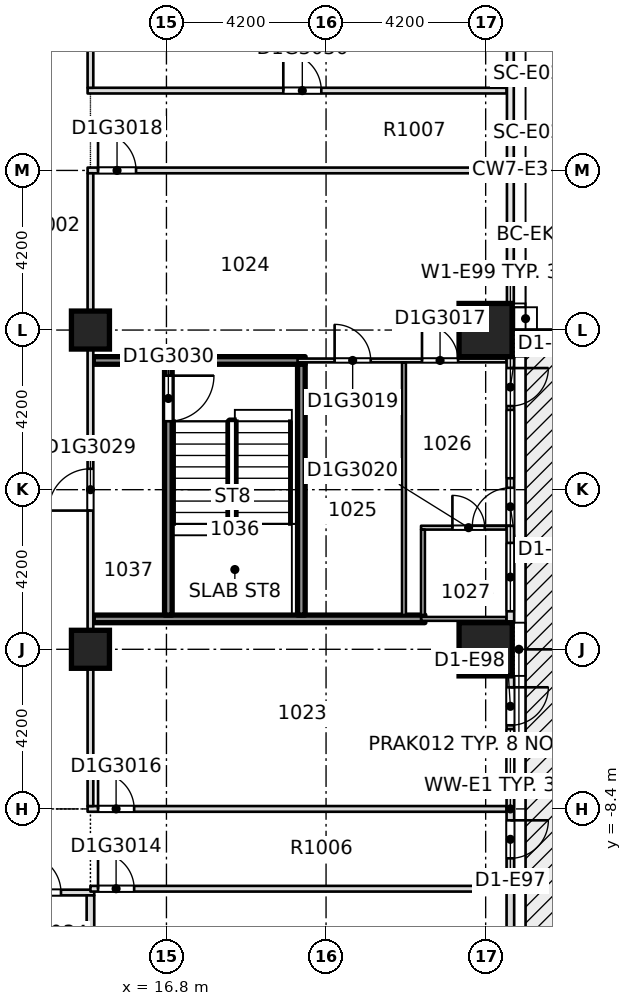
"""IFC4 building model, lengths in metres.
Left out: names, types, materials, properties, quantities, classifications, styles, units other than length and angle.
Written with IfcOpenShell. Run it as: python <this file> out.ifc"""

import sys

from ifc_helpers import new_model, si_unit, direction, frame, frame_2d, origin, origin_2d, place, context, subcontext, project, spatial, rectangle, extrude, element, fill, save


model = new_model("IFC4")
c1 = context("Model", 3, precision=1e-05, world=origin(), true_north=direction((0.0, 1.0)))
c2 = subcontext(c1, "Body", "Model", "MODEL_VIEW")
j1 = project(units=[si_unit("LENGTHUNIT", "METRE"), si_unit("PLANEANGLEUNIT", "RADIAN")], contexts=[c1])
p1 = place(None, origin())
s1 = spatial("IfcSite", under=j1, at=p1, CompositionType="ELEMENT")
p2 = place(p1, origin())
s2 = spatial("IfcBuilding", under=s1, at=p2, CompositionType="ELEMENT")
p3 = place(p2, frame((0.0, 0.0, 48.3)))
s3 = spatial("IfcBuildingStorey", under=s2, at=p3, CompositionType="ELEMENT", Elevation=48.3)
for number, where, z_axis, x_axis in (
    (1, (25.2, -4.2, -0.32), (0.0, 0.0, 1.0), (1.0, 0.0, 0.0)),
    (2, (25.2, 4.2, -0.32), (0.0, 0.0, 1.0), (1.0, 0.0, 0.0)),
):
    element("IfcColumn", number, at=place(p3, frame(where, z_axis=z_axis, x_axis=x_axis)), inside=s3, PredefinedType="COLUMN", context=c2, shape_type="SweptSolid", body=[
        extrude(rectangle(XDim=1.4, YDim=1.4, at=origin_2d()), origin(), (0.0, 0.0, 1.0), 3.45),
    ])
for number, where, z_axis, x_axis in (
    (3, (14.8, -4.2, -0.32), (0.0, 0.0, 1.0), (1.0, 0.0, 0.0)),
    (4, (14.8, 4.2, -0.32), (0.0, 0.0, 1.0), (1.0, 0.0, 0.0)),
):
    element("IfcColumn", number, at=place(p3, frame(where, z_axis=z_axis, x_axis=x_axis)), inside=s3, PredefinedType="COLUMN", context=c2, shape_type="SweptSolid", body=[
        extrude(rectangle(XDim=1.0, YDim=1.0, at=origin_2d()), origin(), (0.0, 0.0, 1.0), 3.45),
    ])
p4 = place(p3, frame((8.5, -10.6, 0.0), z_axis=(0.0, 0.0, 1.0), x_axis=(1.0, 0.0, 0.0)))
e5 = element("IfcWall", 5, at=p4, inside=s3, PredefinedType="PARTITIONING", context=c2, shape_type="SweptSolid", body=[
    extrude(rectangle(XDim=6.4, YDim=0.15, at=frame_2d((3.2, 0.0))), origin(), (0.0, 0.0, 1.0), 3.13),
])
p5 = place(p4, frame((1.35, 0.0, 0.0)))
e6 = element("IfcOpeningElement", 6, at=p5, cuts=e5, PredefinedType="OPENING", context=c2, shape_type="SweptSolid", body=[
    extrude(rectangle(XDim=1.1, YDim=2.1, at=frame_2d((0.55, 1.05))), frame((0.0, 0.085, 0.0), z_axis=(0.0, -1.0, 0.0), x_axis=(1.0, 0.0, 0.0)), (0.0, 0.0, 1.0), 0.17),
])
p6 = place(p4, frame((4.525, 0.0, 0.0)))
e7 = element("IfcOpeningElement", 7, at=p6, cuts=e5, PredefinedType="OPENING", context=c2, shape_type="SweptSolid", body=[
    extrude(rectangle(XDim=1.0, YDim=2.1, at=frame_2d((0.5, 1.05))), frame((0.0, 0.085, 0.0), z_axis=(0.0, -1.0, 0.0), x_axis=(1.0, 0.0, 0.0)), (0.0, 0.0, 1.0), 0.17),
])
p7 = place(p3, frame((14.8, -10.5, 0.0), z_axis=(0.0, 0.0, 1.0), x_axis=(1.0, 0.0, 0.0)))
e8 = element("IfcWall", 8, at=p7, inside=s3, PredefinedType="PARTITIONING", context=c2, shape_type="SweptSolid", body=[
    extrude(rectangle(XDim=10.95, YDim=0.15, at=frame_2d((5.475, 0.0))), origin(), (0.0, 0.0, 1.0), 3.13),
])
p8 = place(p7, frame((0.2, 0.0, 0.0)))
e9 = element("IfcOpeningElement", 9, at=p8, cuts=e8, PredefinedType="OPENING", context=c2, shape_type="SweptSolid", body=[
    extrude(rectangle(XDim=0.95, YDim=2.1, at=frame_2d((0.475, 1.05))), frame((0.0, 0.085, 0.0), z_axis=(0.0, -1.0, 0.0), x_axis=(1.0, 0.0, 0.0)), (0.0, 0.0, 1.0), 0.17),
])
p9 = place(p3, frame((14.725, -8.4, 0.0), z_axis=(0.0, 0.0, 1.0), x_axis=(1.0, 0.0, 0.0)))
e10 = element("IfcWall", 10, at=p9, inside=s3, PredefinedType="PARTITIONING", context=c2, shape_type="SweptSolid", body=[
    extrude(rectangle(XDim=11.025, YDim=0.15, at=frame_2d((5.512, 0.0))), origin(), (0.0, 0.0, 1.0), 3.13),
])
p10 = place(p9, frame((0.275, 0.0, 0.0)))
e11 = element("IfcOpeningElement", 11, at=p10, cuts=e10, PredefinedType="OPENING", context=c2, shape_type="SweptSolid", body=[
    extrude(rectangle(XDim=0.95, YDim=2.1, at=frame_2d((0.475, 1.05))), frame((0.0, 0.085, 0.0), z_axis=(0.0, -1.0, 0.0), x_axis=(1.0, 0.0, 0.0)), (0.0, 0.0, 1.0), 0.17),
])
p11 = place(p3, frame((14.875, -3.4, 0.0), z_axis=(0.0, 0.0, 1.0), x_axis=(1.0, 0.0, 0.0)))
e12 = element("IfcWall", 12, at=p11, inside=s3, PredefinedType="SOLIDWALL", context=c2, shape_type="SweptSolid", body=[
    extrude(rectangle(XDim=8.725, YDim=0.2, at=frame_2d((4.363, 0.0))), origin(), (0.0, 0.0, 1.0), 3.13),
])
p12 = place(p3, frame((23.5, -3.4, 0.0), z_axis=(0.0, 0.0, 1.0), x_axis=(1.0, 0.0, 0.0)))
e13 = element("IfcWall", 13, at=p12, inside=s3, PredefinedType="PARTITIONING", context=c2, shape_type="SweptSolid", body=[
    extrude(rectangle(XDim=2.25, YDim=0.1, at=frame_2d((1.125, 0.0))), origin(), (0.0, 0.0, 1.0), 3.13),
])
p13 = place(p3, frame((23.5, -1.0, 0.0), z_axis=(0.0, 0.0, 1.0), x_axis=(1.0, 0.0, 0.0)))
e14 = element("IfcWall", 14, at=p13, inside=s3, PredefinedType="PARTITIONING", context=c2, shape_type="SweptSolid", body=[
    extrude(rectangle(XDim=2.25, YDim=0.1, at=frame_2d((1.125, 0.0))), origin(), (0.0, 0.0, 1.0), 3.13),
])
p14 = place(p13, frame((0.825, 0.0, 0.0)))
e15 = element("IfcOpeningElement", 15, at=p14, cuts=e14, PredefinedType="OPENING", context=c2, shape_type="SweptSolid", body=[
    extrude(rectangle(XDim=0.85, YDim=2.1, at=frame_2d((0.425, 1.05))), frame((0.0, 0.06, 0.0), z_axis=(0.0, -1.0, 0.0), x_axis=(1.0, 0.0, 0.0)), (0.0, 0.0, 1.0), 0.12),
])
p15 = place(p3, frame((14.875, 3.4, 0.0), z_axis=(0.0, 0.0, 1.0), x_axis=(1.0, 0.0, 0.0)))
e16 = element("IfcWall", 16, at=p15, inside=s3, PredefinedType="SOLIDWALL", context=c2, shape_type="SweptSolid", body=[
    extrude(rectangle(XDim=5.575, YDim=0.2, at=frame_2d((2.788, 0.0))), origin(), (0.0, 0.0, 1.0), 3.13),
])
p16 = place(p3, frame((20.25, 3.4, 0.0), z_axis=(0.0, 0.0, 1.0), x_axis=(1.0, 0.0, 0.0)))
e17 = element("IfcWall", 17, at=p16, inside=s3, PredefinedType="PARTITIONING", context=c2, shape_type="SweptSolid", body=[
    extrude(rectangle(XDim=5.5, YDim=0.1, at=frame_2d((2.75, 0.0))), origin(), (0.0, 0.0, 1.0), 3.13),
])
p17 = place(p16, frame((3.275, 0.0, 0.0)))
e18 = element("IfcOpeningElement", 18, at=p17, cuts=e17, PredefinedType="OPENING", context=c2, shape_type="SweptSolid", body=[
    extrude(rectangle(XDim=0.95, YDim=2.1, at=frame_2d((0.475, 1.05))), frame((0.0, 0.06, 0.0), z_axis=(0.0, -1.0, 0.0), x_axis=(1.0, 0.0, 0.0)), (0.0, 0.0, 1.0), 0.12),
])
p18 = place(p16, frame((0.975, 0.0, 0.0)))
e19 = element("IfcOpeningElement", 19, at=p18, cuts=e17, PredefinedType="OPENING", context=c2, shape_type="SweptSolid", body=[
    extrude(rectangle(XDim=0.95, YDim=2.1, at=frame_2d((0.475, 1.05))), frame((0.0, 0.06, 0.0), z_axis=(0.0, -1.0, 0.0), x_axis=(1.0, 0.0, 0.0)), (0.0, 0.0, 1.0), 0.12),
])
p19 = place(p3, frame((14.725, 8.4, 0.0), z_axis=(0.0, 0.0, 1.0), x_axis=(1.0, 0.0, 0.0)))
e20 = element("IfcWall", 20, at=p19, inside=s3, PredefinedType="PARTITIONING", context=c2, shape_type="SweptSolid", body=[
    extrude(rectangle(XDim=11.025, YDim=0.15, at=frame_2d((5.512, 0.0))), origin(), (0.0, 0.0, 1.0), 3.13),
])
p20 = place(p19, frame((0.275, 0.0, 0.0)))
e21 = element("IfcOpeningElement", 21, at=p20, cuts=e20, PredefinedType="OPENING", context=c2, shape_type="SweptSolid", body=[
    extrude(rectangle(XDim=1.0, YDim=2.1, at=frame_2d((0.5, 1.05))), frame((0.0, 0.085, 0.0), z_axis=(0.0, -1.0, 0.0), x_axis=(1.0, 0.0, 0.0)), (0.0, 0.0, 1.0), 0.17),
])
p21 = place(p3, frame((14.725, 10.5, 0.0), z_axis=(0.0, 0.0, 1.0), x_axis=(1.0, 0.0, 0.0)))
e22 = element("IfcWall", 22, at=p21, inside=s3, PredefinedType="PARTITIONING", context=c2, shape_type="SweptSolid", body=[
    extrude(rectangle(XDim=11.025, YDim=0.15, at=frame_2d((5.512, 0.0))), origin(), (0.0, 0.0, 1.0), 3.13),
])
p22 = place(p21, frame((5.15, 0.0, 0.0)))
e23 = element("IfcOpeningElement", 23, at=p22, cuts=e22, PredefinedType="OPENING", context=c2, shape_type="SweptSolid", body=[
    extrude(rectangle(XDim=1.0, YDim=2.1, at=frame_2d((0.5, 1.05))), frame((0.0, 0.085, 0.0), z_axis=(0.0, -1.0, 0.0), x_axis=(1.0, 0.0, 0.0)), (0.0, 0.0, 1.0), 0.17),
])
p23 = place(p3, frame((14.8, -19.3, 0.0), z_axis=(0.0, 0.0, 1.0), x_axis=(0.0, 1.0, 0.0)))
e24 = element("IfcWall", 24, at=p23, inside=s3, PredefinedType="PARTITIONING", context=c2, shape_type="SweptSolid", body=[
    extrude(rectangle(XDim=8.625, YDim=0.2, at=frame_2d((4.312, 0.0))), origin(), (0.0, 0.0, 1.0), 3.13),
])
p24 = place(p3, frame((14.8, -8.325, 0.0), z_axis=(0.0, 0.0, 1.0), x_axis=(0.0, 1.0, 0.0)))
e25 = element("IfcWall", 25, at=p24, inside=s3, PredefinedType="PARTITIONING", context=c2, shape_type="SweptSolid", body=[
    extrude(rectangle(XDim=16.65, YDim=0.15, at=frame_2d((8.325, 0.0))), origin(), (0.0, 0.0, 1.0), 3.13),
])
p25 = place(p24, frame((7.775, 0.0, 0.0)))
e26 = element("IfcOpeningElement", 26, at=p25, cuts=e25, PredefinedType="OPENING", context=c2, shape_type="SweptSolid", body=[
    extrude(rectangle(XDim=1.1, YDim=2.1, at=frame_2d((0.55, 1.05))), frame((0.0, 0.085, 0.0), z_axis=(0.0, -1.0, 0.0), x_axis=(1.0, 0.0, 0.0)), (0.0, 0.0, 1.0), 0.17),
])
p26 = place(p3, frame((14.8, 10.575, 0.0), z_axis=(0.0, 0.0, 1.0), x_axis=(0.0, 1.0, 0.0)))
e27 = element("IfcWall", 27, at=p26, inside=s3, PredefinedType="PARTITIONING", context=c2, shape_type="SweptSolid", body=[
    extrude(rectangle(XDim=2.725, YDim=0.15, at=frame_2d((1.363, 0.0))), origin(), (0.0, 0.0, 1.0), 3.13),
])
p27 = place(p3, frame((16.85, -3.3, 0.0), z_axis=(0.0, 0.0, 1.0), x_axis=(0.0, 1.0, 0.0)))
e28 = element("IfcWall", 28, at=p27, inside=s3, PredefinedType="SOLIDWALL", context=c2, shape_type="SweptSolid", body=[
    extrude(rectangle(XDim=6.6, YDim=0.2, at=frame_2d((3.3, 0.0))), origin(), (0.0, 0.0, 1.0), 3.13),
])
p28 = place(p27, frame((5.1, 0.0, 0.0)))
e29 = element("IfcOpeningElement", 29, at=p28, cuts=e28, PredefinedType="OPENING", context=c2, shape_type="SweptSolid", body=[
    extrude(rectangle(XDim=1.2, YDim=2.1, at=frame_2d((0.6, 1.05))), frame((0.0, 0.11, 0.0), z_axis=(0.0, -1.0, 0.0), x_axis=(1.0, 0.0, 0.0)), (0.0, 0.0, 1.0), 0.22),
])
p29 = place(p3, frame((20.35, -3.3, 0.0), z_axis=(0.0, 0.0, 1.0), x_axis=(0.0, 1.0, 0.0)))
e30 = element("IfcWall", 30, at=p29, inside=s3, PredefinedType="SOLIDWALL", context=c2, shape_type="SweptSolid", body=[
    extrude(rectangle(XDim=6.6, YDim=0.2, at=frame_2d((3.3, 0.0))), origin(), (0.0, 0.0, 1.0), 3.13),
])
p30 = place(p3, frame((23.05, -3.3, 0.0), z_axis=(0.0, 0.0, 1.0), x_axis=(0.0, 1.0, 0.0)))
e31 = element("IfcWall", 31, at=p30, inside=s3, PredefinedType="PARTITIONING", context=c2, shape_type="SweptSolid", body=[
    extrude(rectangle(XDim=6.65, YDim=0.1, at=frame_2d((3.325, 0.0))), origin(), (0.0, 0.0, 1.0), 3.13),
])
p31 = place(p3, frame((23.55, -3.3, 0.0), z_axis=(0.0, 0.0, 1.0), x_axis=(0.0, 1.0, 0.0)))
e32 = element("IfcWall", 32, at=p31, inside=s3, PredefinedType="PARTITIONING", context=c2, shape_type="SweptSolid", body=[
    extrude(rectangle(XDim=2.25, YDim=0.1, at=frame_2d((1.125, 0.0))), origin(), (0.0, 0.0, 1.0), 3.13),
])
p32 = place(p3, frame((25.85, -11.9, 0.0), z_axis=(0.0, 0.0, 1.0), x_axis=(0.0, 1.0, 0.0)))
e33 = element("IfcWall", 33, at=p32, inside=s3, PredefinedType="STANDARD", context=c2, shape_type="SweptSolid", body=[
    extrude(rectangle(XDim=7.0, YDim=0.2, at=frame_2d((3.5, 0.0))), origin(), (0.0, 0.0, 1.0), 3.13),
])
p33 = place(p32, frame((2.2, 0.0, 0.0)))
e34 = element("IfcOpeningElement", 34, at=p33, cuts=e33, PredefinedType="OPENING", context=c2, shape_type="SweptSolid", body=[
    extrude(rectangle(XDim=1.0, YDim=2.4, at=frame_2d((0.5, 1.2))), frame((0.0, 0.11, 0.0), z_axis=(0.0, -1.0, 0.0), x_axis=(1.0, 0.0, 0.0)), (0.0, 0.0, 1.0), 0.22),
])
p34 = place(p32, frame((3.8, 0.0, 0.2)))
e35 = element("IfcOpeningElement", 35, at=p34, cuts=e33, PredefinedType="OPENING", context=c2, shape_type="SweptSolid", body=[
    extrude(rectangle(XDim=1.8, YDim=2.65, at=frame_2d((0.9, 1.325))), frame((0.0, 0.11, 0.0), z_axis=(0.0, -1.0, 0.0), x_axis=(1.0, 0.0, 0.0)), (0.0, 0.0, 1.0), 0.22),
])
p35 = place(p32, frame((5.7, 0.0, 0.0)))
e36 = element("IfcOpeningElement", 36, at=p35, cuts=e33, PredefinedType="OPENING", context=c2, shape_type="SweptSolid", body=[
    extrude(rectangle(XDim=1.0, YDim=2.4, at=frame_2d((0.5, 1.2))), frame((0.0, 0.11, 0.0), z_axis=(0.0, -1.0, 0.0), x_axis=(1.0, 0.0, 0.0)), (0.0, 0.0, 1.0), 0.22),
])
p36 = place(p3, frame((25.85, -3.5, 0.0), z_axis=(0.0, 0.0, 1.0), x_axis=(0.0, 1.0, 0.0)))
e37 = element("IfcWall", 37, at=p36, inside=s3, PredefinedType="STANDARD", context=c2, shape_type="SweptSolid", body=[
    extrude(rectangle(XDim=7.0, YDim=0.2, at=frame_2d((3.5, 0.0))), origin(), (0.0, 0.0, 1.0), 3.13),
])
p37 = place(p36, frame((0.3, 0.0, 0.2)))
e38 = element("IfcOpeningElement", 38, at=p37, cuts=e37, PredefinedType="OPENING", context=c2, shape_type="SweptSolid", body=[
    extrude(rectangle(XDim=1.8, YDim=2.65, at=frame_2d((0.9, 1.325))), frame((0.0, 0.11, 0.0), z_axis=(0.0, -1.0, 0.0), x_axis=(1.0, 0.0, 0.0)), (0.0, 0.0, 1.0), 0.22),
])
p38 = place(p36, frame((2.55, 0.0, 0.0)))
e39 = element("IfcOpeningElement", 39, at=p38, cuts=e37, PredefinedType="OPENING", context=c2, shape_type="SweptSolid", body=[
    extrude(rectangle(XDim=1.0, YDim=2.4, at=frame_2d((0.5, 1.2))), frame((0.0, 0.11, 0.0), z_axis=(0.0, -1.0, 0.0), x_axis=(1.0, 0.0, 0.0)), (0.0, 0.0, 1.0), 0.22),
])
p39 = place(p36, frame((3.8, 0.0, 0.2)))
e40 = element("IfcOpeningElement", 40, at=p39, cuts=e37, PredefinedType="OPENING", context=c2, shape_type="SweptSolid", body=[
    extrude(rectangle(XDim=1.8, YDim=2.65, at=frame_2d((0.9, 1.325))), frame((0.0, 0.11, 0.0), z_axis=(0.0, -1.0, 0.0), x_axis=(1.0, 0.0, 0.0)), (0.0, 0.0, 1.0), 0.22),
])
p40 = place(p36, frame((5.7, 0.0, 0.0)))
e41 = element("IfcOpeningElement", 41, at=p40, cuts=e37, PredefinedType="OPENING", context=c2, shape_type="SweptSolid", body=[
    extrude(rectangle(XDim=1.0, YDim=2.4, at=frame_2d((0.5, 1.2))), frame((0.0, 0.11, 0.0), z_axis=(0.0, -1.0, 0.0), x_axis=(1.0, 0.0, 0.0)), (0.0, 0.0, 1.0), 0.22),
])
p41 = place(p8, origin())
e42 = element("IfcDoor", 42, at=p41, inside=s3, OperationType="SINGLE_SWING_RIGHT", PredefinedType="DOOR", context=c2, shape_type="SweptSolid", body=[
    extrude(rectangle(XDim=0.95, YDim=2.1, at=frame_2d((0.475, 1.05))), frame((0.0, 0.025, 0.0), z_axis=(0.0, -1.0, 0.0), x_axis=(1.0, 0.0, 0.0)), (0.0, 0.0, 1.0), 0.05),
])
fill(e9, e42)
p42 = place(p10, origin())
e43 = element("IfcDoor", 43, at=p42, inside=s3, OperationType="SINGLE_SWING_LEFT", PredefinedType="DOOR", context=c2, shape_type="SweptSolid", body=[
    extrude(rectangle(XDim=0.95, YDim=2.1, at=frame_2d((0.475, 1.05))), frame((0.0, 0.025, 0.0), z_axis=(0.0, -1.0, 0.0), x_axis=(1.0, 0.0, 0.0)), (0.0, 0.0, 1.0), 0.05),
])
fill(e11, e43)
p43 = place(p17, origin())
e44 = element("IfcDoor", 44, at=p43, inside=s3, OperationType="SINGLE_SWING_RIGHT", PredefinedType="DOOR", context=c2, shape_type="SweptSolid", body=[
    extrude(rectangle(XDim=0.95, YDim=2.1, at=frame_2d((0.475, 1.05))), frame((0.0, 0.025, 0.0), z_axis=(0.0, -1.0, 0.0), x_axis=(1.0, 0.0, 0.0)), (0.0, 0.0, 1.0), 0.05),
])
fill(e18, e44)
p44 = place(p20, origin())
e45 = element("IfcDoor", 45, at=p44, inside=s3, OperationType="SINGLE_SWING_RIGHT", PredefinedType="DOOR", context=c2, shape_type="SweptSolid", body=[
    extrude(rectangle(XDim=1.0, YDim=2.1, at=frame_2d((0.5, 1.05))), frame((0.0, 0.025, 0.0), z_axis=(0.0, -1.0, 0.0), x_axis=(1.0, 0.0, 0.0)), (0.0, 0.0, 1.0), 0.05),
])
fill(e21, e45)
p45 = place(p18, origin())
e46 = element("IfcDoor", 46, at=p45, inside=s3, OperationType="SINGLE_SWING_RIGHT", PredefinedType="DOOR", context=c2, shape_type="SweptSolid", body=[
    extrude(rectangle(XDim=0.95, YDim=2.1, at=frame_2d((0.475, 1.05))), frame((0.0, 0.025, 0.0), z_axis=(0.0, -1.0, 0.0), x_axis=(1.0, 0.0, 0.0)), (0.0, 0.0, 1.0), 0.05),
])
fill(e19, e46)
p46 = place(p14, origin())
e47 = element("IfcDoor", 47, at=p46, inside=s3, OperationType="SINGLE_SWING_RIGHT", PredefinedType="DOOR", context=c2, shape_type="SweptSolid", body=[
    extrude(rectangle(XDim=0.85, YDim=2.1, at=frame_2d((0.425, 1.05))), frame((0.0, 0.025, 0.0), z_axis=(0.0, -1.0, 0.0), x_axis=(1.0, 0.0, 0.0)), (0.0, 0.0, 1.0), 0.05),
])
fill(e15, e47)
p47 = place(p25, origin())
e48 = element("IfcDoor", 48, at=p47, inside=s3, OperationType="SINGLE_SWING_RIGHT", PredefinedType="DOOR", context=c2, shape_type="SweptSolid", body=[
    extrude(rectangle(XDim=1.1, YDim=2.1, at=frame_2d((0.55, 1.05))), frame((0.0, 0.025, 0.0), z_axis=(0.0, -1.0, 0.0), x_axis=(1.0, 0.0, 0.0)), (0.0, 0.0, 1.0), 0.05),
])
fill(e26, e48)
p48 = place(p28, origin())
e49 = element("IfcDoor", 49, at=p48, inside=s3, OperationType="SINGLE_SWING_LEFT", PredefinedType="DOOR", context=c2, shape_type="SweptSolid", body=[
    extrude(rectangle(XDim=1.2, YDim=2.1, at=frame_2d((0.6, 1.05))), frame((0.0, 0.025, 0.0), z_axis=(0.0, -1.0, 0.0), x_axis=(1.0, 0.0, 0.0)), (0.0, 0.0, 1.0), 0.05),
])
fill(e29, e49)
p49 = place(p6, origin())
e50 = element("IfcDoor", 50, at=p49, inside=s3, OperationType="SINGLE_SWING_RIGHT", PredefinedType="DOOR", context=c2, shape_type="SweptSolid", body=[
    extrude(rectangle(XDim=1.0, YDim=2.1, at=frame_2d((0.5, 1.05))), frame((0.0, 0.025, 0.0), z_axis=(0.0, -1.0, 0.0), x_axis=(1.0, 0.0, 0.0)), (0.0, 0.0, 1.0), 0.05),
])
fill(e7, e50)
p50 = place(p22, origin())
e51 = element("IfcDoor", 51, at=p50, inside=s3, OperationType="SINGLE_SWING_RIGHT", PredefinedType="DOOR", context=c2, shape_type="SweptSolid", body=[
    extrude(rectangle(XDim=1.0, YDim=2.1, at=frame_2d((0.5, 1.05))), frame((0.0, 0.025, 0.0), z_axis=(0.0, -1.0, 0.0), x_axis=(1.0, 0.0, 0.0)), (0.0, 0.0, 1.0), 0.05),
])
fill(e23, e51)
p51 = place(p33, origin())
e52 = element("IfcDoor", 52, at=p51, inside=s3, OperationType="SINGLE_SWING_LEFT", PredefinedType="DOOR", context=c2, shape_type="SweptSolid", body=[
    extrude(rectangle(XDim=1.0, YDim=2.4, at=frame_2d((0.5, 1.2))), frame((0.0, 0.025, 0.0), z_axis=(0.0, -1.0, 0.0), x_axis=(1.0, 0.0, 0.0)), (0.0, 0.0, 1.0), 0.05),
])
fill(e34, e52)
p52 = place(p34, origin())
e53 = element("IfcWindow", 53, at=p52, inside=s3, PartitioningType="SINGLE_PANEL", PredefinedType="WINDOW", context=c2, shape_type="SweptSolid", body=[
    extrude(rectangle(XDim=1.8, YDim=2.65, at=frame_2d((0.9, 1.325))), frame((0.0, 0.03, 0.0), z_axis=(0.0, -1.0, 0.0), x_axis=(1.0, 0.0, 0.0)), (0.0, 0.0, 1.0), 0.06),
])
fill(e35, e53)
p53 = place(p35, origin())
e54 = element("IfcDoor", 54, at=p53, inside=s3, OperationType="SINGLE_SWING_LEFT", PredefinedType="DOOR", context=c2, shape_type="SweptSolid", body=[
    extrude(rectangle(XDim=1.0, YDim=2.4, at=frame_2d((0.5, 1.2))), frame((0.0, 0.025, 0.0), z_axis=(0.0, -1.0, 0.0), x_axis=(1.0, 0.0, 0.0)), (0.0, 0.0, 1.0), 0.05),
])
fill(e36, e54)
p54 = place(p37, origin())
e55 = element("IfcWindow", 55, at=p54, inside=s3, PartitioningType="SINGLE_PANEL", PredefinedType="WINDOW", context=c2, shape_type="SweptSolid", body=[
    extrude(rectangle(XDim=1.8, YDim=2.65, at=frame_2d((0.9, 1.325))), frame((0.0, 0.03, 0.0), z_axis=(0.0, -1.0, 0.0), x_axis=(1.0, 0.0, 0.0)), (0.0, 0.0, 1.0), 0.06),
])
fill(e38, e55)
p55 = place(p38, origin())
e56 = element("IfcDoor", 56, at=p55, inside=s3, OperationType="SINGLE_SWING_LEFT", PredefinedType="DOOR", context=c2, shape_type="SweptSolid", body=[
    extrude(rectangle(XDim=1.0, YDim=2.4, at=frame_2d((0.5, 1.2))), frame((0.0, 0.025, 0.0), z_axis=(0.0, -1.0, 0.0), x_axis=(1.0, 0.0, 0.0)), (0.0, 0.0, 1.0), 0.05),
])
fill(e39, e56)
p56 = place(p39, origin())
e57 = element("IfcWindow", 57, at=p56, inside=s3, PartitioningType="SINGLE_PANEL", PredefinedType="WINDOW", context=c2, shape_type="SweptSolid", body=[
    extrude(rectangle(XDim=1.8, YDim=2.65, at=frame_2d((0.9, 1.325))), frame((0.0, 0.03, 0.0), z_axis=(0.0, -1.0, 0.0), x_axis=(1.0, 0.0, 0.0)), (0.0, 0.0, 1.0), 0.06),
])
fill(e40, e57)
p57 = place(p40, origin())
e58 = element("IfcDoor", 58, at=p57, inside=s3, OperationType="SINGLE_SWING_LEFT", PredefinedType="DOOR", context=c2, shape_type="SweptSolid", body=[
    extrude(rectangle(XDim=1.0, YDim=2.4, at=frame_2d((0.5, 1.2))), frame((0.0, 0.025, 0.0), z_axis=(0.0, -1.0, 0.0), x_axis=(1.0, 0.0, 0.0)), (0.0, 0.0, 1.0), 0.05),
])
fill(e41, e58)
save(model, sys.argv[1])
